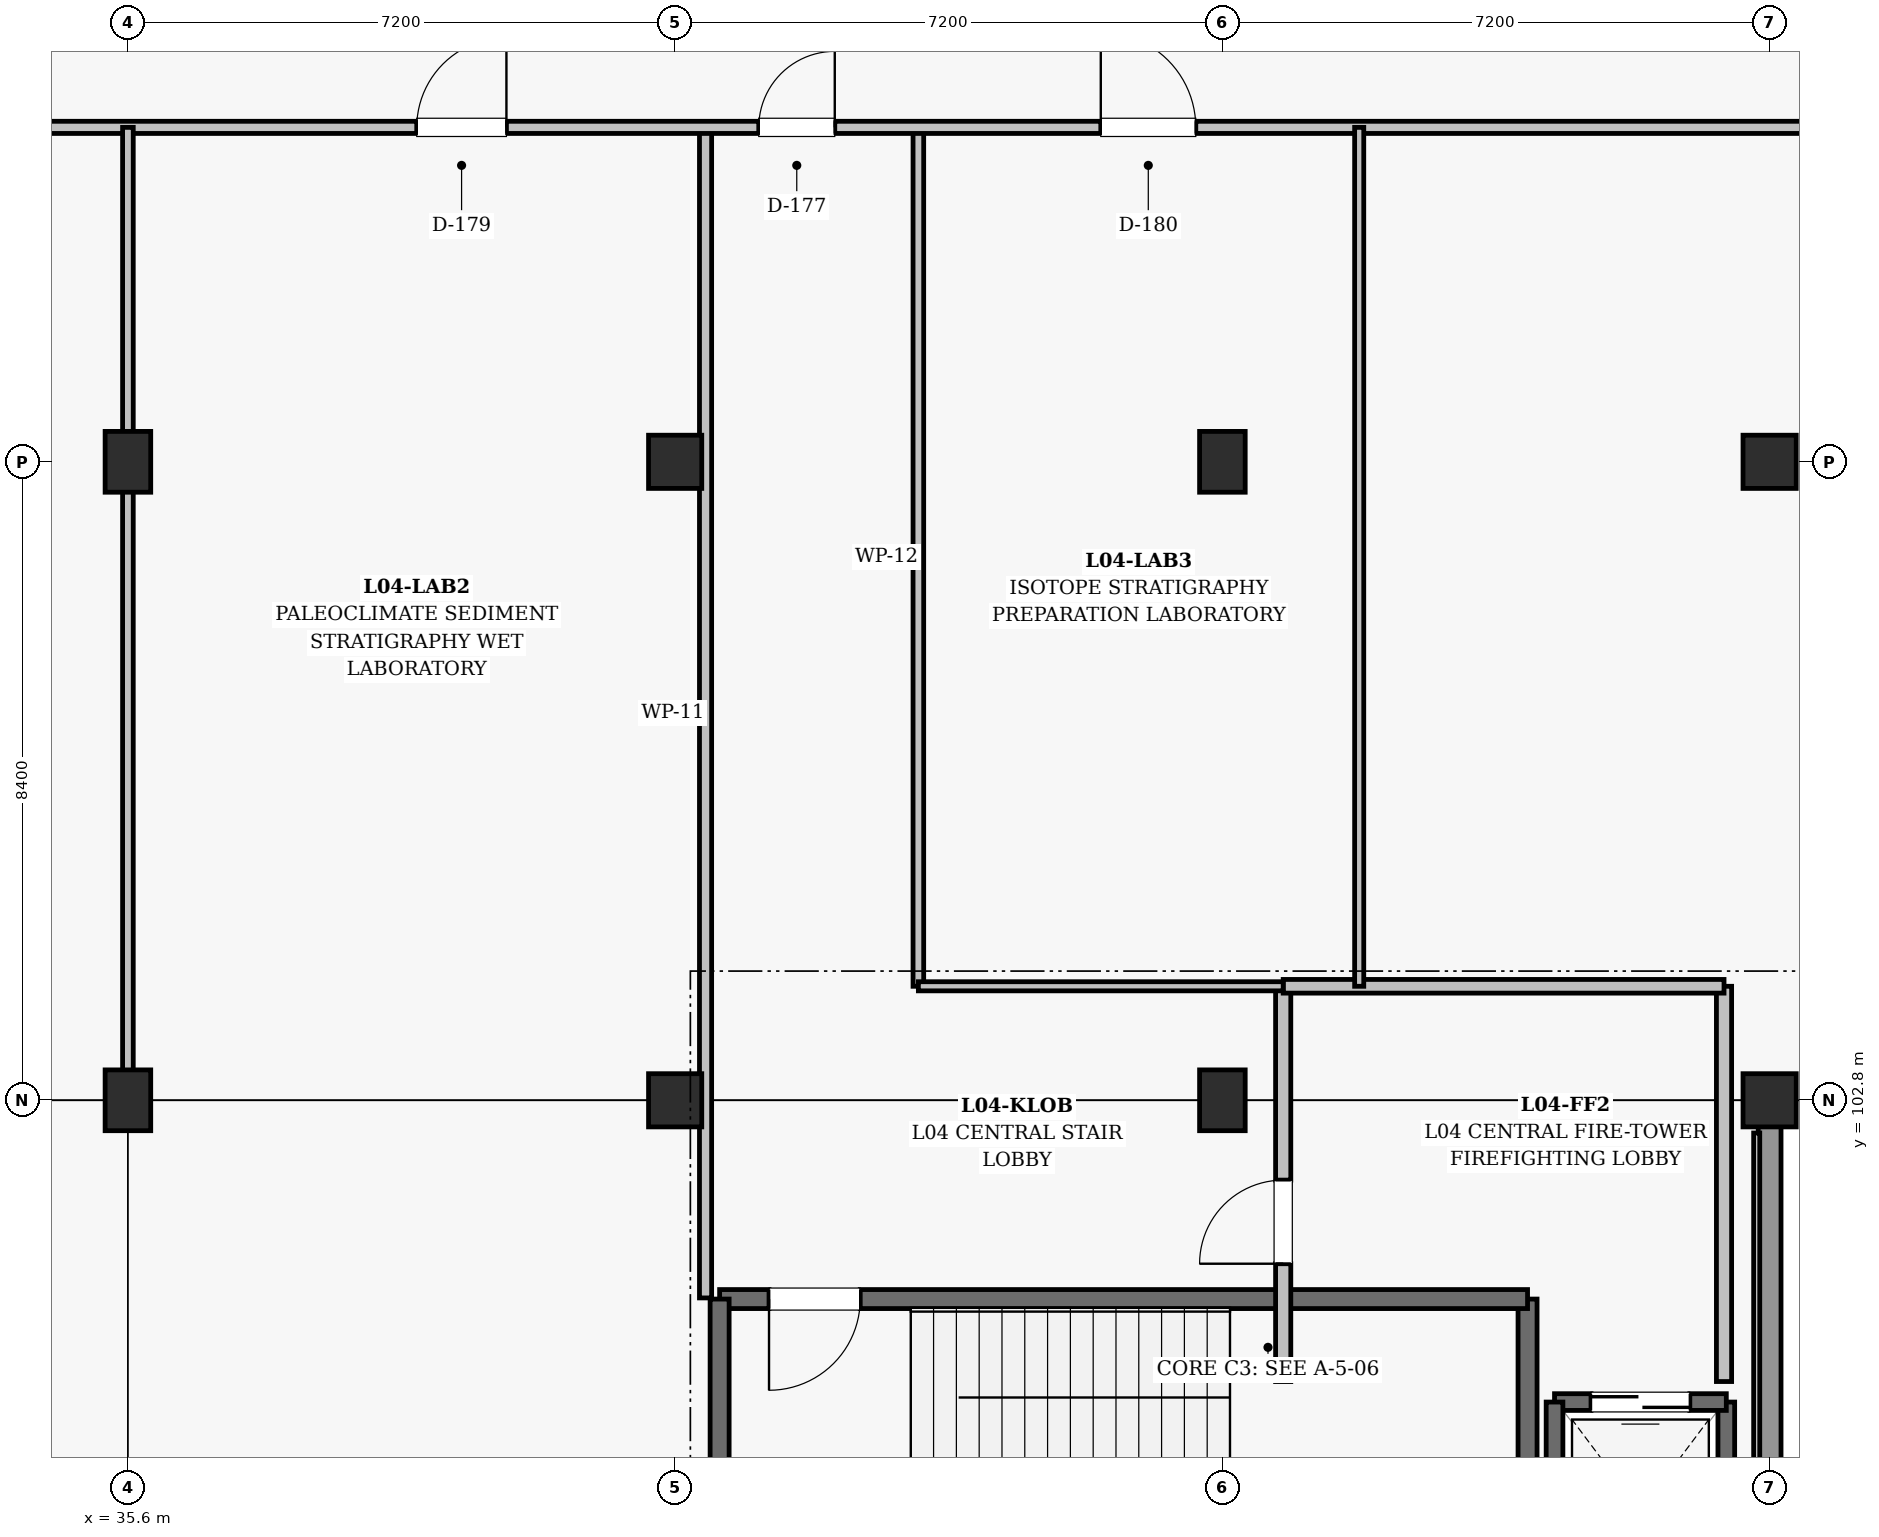
"""IFC4 building model, lengths in metres.
Left out: names, types, materials, properties, quantities, classifications, styles, units other than length and angle.
Written with IfcOpenShell. Run it as: python <this file> out.ifc"""

import sys

from ifc_helpers import new_model, si_unit, direction, frame, frame_2d, origin, origin_2d, place, context, subcontext, project, spatial, rectangle, extrude, element, fill, save


model = new_model("IFC4")
c1 = context("Model", 3, precision=1e-05, world=origin(), true_north=direction((0.0, 1.0)))
c2 = subcontext(c1, "Body", "Model", "MODEL_VIEW")
j1 = project(units=[si_unit("LENGTHUNIT", "METRE"), si_unit("PLANEANGLEUNIT", "RADIAN")], contexts=[c1])
p1 = place(None, origin())
s1 = spatial("IfcSite", under=j1, at=p1, CompositionType="ELEMENT")
p2 = place(p1, origin())
s2 = spatial("IfcBuilding", under=s1, at=p2, CompositionType="ELEMENT")
p3 = place(p2, frame((0.0, 0.0, 18.9)))
s3 = spatial("IfcBuildingStorey", under=s2, at=p3, CompositionType="ELEMENT", Elevation=18.9)
for number, where, z_axis, x_axis in (
    (1, (35.6, 102.8, 0.0), (0.0, 0.0, 1.0), (1.0, 0.0, 0.0)),
    (2, (35.6, 111.2, 0.0), (0.0, 0.0, 1.0), (1.0, 0.0, 0.0)),
):
    element("IfcColumn", number, at=place(p3, frame(where, z_axis=z_axis, x_axis=x_axis)), inside=s3, PredefinedType="COLUMN", context=c2, shape_type="SweptSolid", body=[
        extrude(rectangle(XDim=0.6, YDim=0.8, at=origin_2d()), origin(), (0.0, 0.0, 1.0), 4.5),
    ])
for number, where, z_axis, x_axis in (
    (3, (42.8, 102.8, 0.0), (0.0, 0.0, 1.0), (1.0, 0.0, 0.0)),
    (4, (42.8, 111.2, 0.0), (0.0, 0.0, 1.0), (1.0, 0.0, 0.0)),
):
    element("IfcColumn", number, at=place(p3, frame(where, z_axis=z_axis, x_axis=x_axis)), inside=s3, PredefinedType="COLUMN", context=c2, shape_type="SweptSolid", body=[
        extrude(rectangle(XDim=0.7, YDim=0.7, at=origin_2d()), origin(), (0.0, 0.0, 1.0), 4.5),
    ])
for number, where, z_axis, x_axis in (
    (5, (50.0, 102.8, 0.0), (0.0, 0.0, 1.0), (1.0, 0.0, 0.0)),
    (6, (50.0, 111.2, 0.0), (0.0, 0.0, 1.0), (1.0, 0.0, 0.0)),
):
    element("IfcColumn", number, at=place(p3, frame(where, z_axis=z_axis, x_axis=x_axis)), inside=s3, PredefinedType="COLUMN", context=c2, shape_type="SweptSolid", body=[
        extrude(rectangle(XDim=0.6, YDim=0.8, at=origin_2d()), origin(), (0.0, 0.0, 1.0), 4.5),
    ])
for number, where, z_axis, x_axis in (
    (7, (57.2, 102.8, 0.0), (0.0, 0.0, 1.0), (1.0, 0.0, 0.0)),
    (8, (57.2, 111.2, 0.0), (0.0, 0.0, 1.0), (1.0, 0.0, 0.0)),
):
    element("IfcColumn", number, at=place(p3, frame(where, z_axis=z_axis, x_axis=x_axis)), inside=s3, PredefinedType="COLUMN", context=c2, shape_type="SweptSolid", body=[
        extrude(rectangle(XDim=0.7, YDim=0.7, at=origin_2d()), origin(), (0.0, 0.0, 1.0), 4.5),
    ])
p4 = place(p3, frame((57.2, 94.705, 0.0), z_axis=(0.0, 0.0, 1.0), x_axis=(0.0, 1.0, 0.0)))
e9 = element("IfcWall", 9, at=p4, inside=s3, PredefinedType="SOLIDWALL", context=c2, shape_type="SweptSolid", body=[
    extrude(rectangle(XDim=7.765, YDim=0.3, at=frame_2d((3.882, 0.0))), origin(), (0.0, 0.0, 1.0), 3.355),
])
p5 = place(p3, frame((54.015, 95.085, 0.0), z_axis=(0.0, 0.0, 1.0), x_axis=(0.0, 1.0, 0.0)))
e10 = element("IfcWall", 10, at=p5, inside=s3, PredefinedType="SHEAR", context=c2, shape_type="SweptSolid", body=[
    extrude(rectangle(XDim=5.1, YDim=0.25, at=frame_2d((2.55, 0.0))), origin(), (0.0, 0.0, 1.0), 4.175),
])
p6 = place(p3, frame((54.015, 100.185, 0.0), z_axis=(0.0, 0.0, 1.0), x_axis=(-1.0, 0.0, 0.0)))
e11 = element("IfcWall", 11, at=p6, inside=s3, PredefinedType="SHEAR", context=c2, shape_type="SweptSolid", body=[
    extrude(rectangle(XDim=10.63, YDim=0.25, at=frame_2d((5.315, 0.0))), origin(), (0.0, 0.0, 1.0), 4.175),
])
p7 = place(p6, frame((8.78, 0.0, 0.0)))
e12 = element("IfcOpeningElement", 12, at=p7, cuts=e11, PredefinedType="OPENING", context=c2, shape_type="SweptSolid", body=[
    extrude(rectangle(XDim=1.2, YDim=2.15, at=frame_2d((0.6, 1.075))), frame((0.0, 0.135, 0.0), z_axis=(0.0, -1.0, 0.0), x_axis=(1.0, 0.0, 0.0)), (0.0, 0.0, 1.0), 0.27),
])
p8 = place(p3, frame((43.385, 100.185, 0.0), z_axis=(0.0, 0.0, 1.0), x_axis=(0.0, -1.0, 0.0)))
e13 = element("IfcWall", 13, at=p8, inside=s3, PredefinedType="SHEAR", context=c2, shape_type="SweptSolid", body=[
    extrude(rectangle(XDim=5.1, YDim=0.25, at=frame_2d((2.55, 0.0))), origin(), (0.0, 0.0, 1.0), 4.175),
])
p9 = place(p3, frame((56.63, 95.97, 0.0), z_axis=(0.0, 0.0, 1.0), x_axis=(0.0, 1.0, 0.0)))
e14 = element("IfcWall", 14, at=p9, inside=s3, PredefinedType="SHEAR", context=c2, shape_type="SweptSolid", body=[
    extrude(rectangle(XDim=2.86, YDim=0.22, at=frame_2d((1.43, 0.0))), origin(), (0.0, 0.0, 1.0), 4.175),
])
p10 = place(p3, frame((56.63, 98.83, 0.0), z_axis=(0.0, 0.0, 1.0), x_axis=(-1.0, 0.0, 0.0)))
e15 = element("IfcWall", 15, at=p10, inside=s3, PredefinedType="SHEAR", context=c2, shape_type="SweptSolid", body=[
    extrude(rectangle(XDim=2.26, YDim=0.22, at=frame_2d((1.13, 0.0))), origin(), (0.0, 0.0, 1.0), 4.175),
])
p11 = place(p10, frame((0.48, 0.0, 0.0)))
e16 = element("IfcOpeningElement", 16, at=p11, cuts=e15, PredefinedType="OPENING", context=c2, shape_type="SweptSolid", body=[
    extrude(rectangle(XDim=1.3, YDim=2.2, at=frame_2d((0.65, 1.1))), frame((0.0, 0.12, 0.0), z_axis=(0.0, -1.0, 0.0), x_axis=(1.0, 0.0, 0.0)), (0.0, 0.0, 1.0), 0.24),
])
p12 = place(p3, frame((54.37, 98.83, 0.0), z_axis=(0.0, 0.0, 1.0), x_axis=(0.0, -1.0, 0.0)))
e17 = element("IfcWall", 17, at=p12, inside=s3, PredefinedType="SHEAR", context=c2, shape_type="SweptSolid", body=[
    extrude(rectangle(XDim=2.86, YDim=0.22, at=frame_2d((1.43, 0.0))), origin(), (0.0, 0.0, 1.0), 4.175),
])
p13 = place(p3, frame((50.8, 99.1, 0.0), z_axis=(0.0, 0.0, 1.0), x_axis=(0.0, 1.0, 0.0)))
e18 = element("IfcWall", 18, at=p13, inside=s3, PredefinedType="SOLIDWALL", context=c2, shape_type="SweptSolid", body=[
    extrude(rectangle(XDim=5.2, YDim=0.2, at=frame_2d((2.6, 0.0))), origin(), (0.0, 0.0, 1.0), 3.36),
])
p14 = place(p13, frame((1.55, 0.0, 0.0)))
e19 = element("IfcOpeningElement", 19, at=p14, cuts=e18, PredefinedType="OPENING", context=c2, shape_type="SweptSolid", body=[
    extrude(rectangle(XDim=1.1, YDim=2.15, at=frame_2d((0.55, 1.075))), frame((0.0, 0.11, 0.0), z_axis=(0.0, -1.0, 0.0), x_axis=(1.0, 0.0, 0.0)), (0.0, 0.0, 1.0), 0.22),
])
p15 = place(p3, frame((56.6, 99.1, 0.0), z_axis=(0.0, 0.0, 1.0), x_axis=(0.0, 1.0, 0.0)))
e20 = element("IfcWall", 20, at=p15, inside=s3, PredefinedType="SOLIDWALL", context=c2, shape_type="SweptSolid", body=[
    extrude(rectangle(XDim=5.2, YDim=0.2, at=frame_2d((2.6, 0.0))), origin(), (0.0, 0.0, 1.0), 3.36),
])
p16 = place(p3, frame((50.8, 104.3, 0.0), z_axis=(0.0, 0.0, 1.0), x_axis=(1.0, 0.0, 0.0)))
e21 = element("IfcWall", 21, at=p16, inside=s3, PredefinedType="SOLIDWALL", context=c2, shape_type="SweptSolid", body=[
    extrude(rectangle(XDim=5.8, YDim=0.18, at=frame_2d((2.9, 0.0))), origin(), (0.0, 0.0, 1.0), 3.56),
])
p17 = place(p3, frame((43.2, 100.2, 0.0), z_axis=(0.0, 0.0, 1.0), x_axis=(0.0, 1.0, 0.0)))
e22 = element("IfcWall", 22, at=p17, inside=s3, PredefinedType="PARTITIONING", context=c2, shape_type="SweptSolid", body=[
    extrude(rectangle(XDim=15.4, YDim=0.16, at=frame_2d((7.7, 0.0))), origin(), (0.0, 0.0, 1.0), 2.96),
])
p18 = place(p3, frame((46.0, 104.3, 0.0), z_axis=(0.0, 0.0, 1.0), x_axis=(0.0, 1.0, 0.0)))
e23 = element("IfcWall", 23, at=p18, inside=s3, PredefinedType="PARTITIONING", context=c2, shape_type="SweptSolid", body=[
    extrude(rectangle(XDim=11.3, YDim=0.14, at=frame_2d((5.65, 0.0))), origin(), (0.0, 0.0, 1.0), 3.52),
])
p19 = place(p3, frame((46.0, 104.3, 0.0), z_axis=(0.0, 0.0, 1.0), x_axis=(1.0, 0.0, 0.0)))
e24 = element("IfcWall", 24, at=p19, inside=s3, PredefinedType="PARTITIONING", context=c2, shape_type="SweptSolid", body=[
    extrude(rectangle(XDim=4.8, YDim=0.12, at=frame_2d((2.4, 0.0))), origin(), (0.0, 0.0, 1.0), 3.31),
])
p20 = place(p3, frame((14.0, 115.6, 0.0), z_axis=(0.0, 0.0, 1.0), x_axis=(1.0, 0.0, 0.0)))
e25 = element("IfcWall", 25, at=p20, inside=s3, PredefinedType="PARTITIONING", context=c2, shape_type="SweptSolid", body=[
    extrude(rectangle(XDim=100.8, YDim=0.16, at=frame_2d((50.4, 0.0))), origin(), (0.0, 0.0, 1.0), 2.96),
])
p21 = place(p20, frame((29.9, 0.0, 0.0)))
e26 = element("IfcOpeningElement", 26, at=p21, cuts=e25, PredefinedType="OPENING", context=c2, shape_type="SweptSolid", body=[
    extrude(rectangle(XDim=1.0, YDim=2.15, at=frame_2d((0.5, 1.075))), frame((0.0, 0.09, 0.0), z_axis=(0.0, -1.0, 0.0), x_axis=(1.0, 0.0, 0.0)), (0.0, 0.0, 1.0), 0.18),
])
p22 = place(p20, frame((11.0, 0.0, 0.0)))
e27 = element("IfcOpeningElement", 27, at=p22, cuts=e25, PredefinedType="OPENING", context=c2, shape_type="SweptSolid", body=[
    extrude(rectangle(XDim=1.5, YDim=2.25, at=frame_2d((0.75, 1.125))), frame((0.0, 0.09, 0.0), z_axis=(0.0, -1.0, 0.0), x_axis=(1.0, 0.0, 0.0)), (0.0, 0.0, 1.0), 0.18),
])
p23 = place(p20, frame((25.4, 0.0, 0.0)))
e28 = element("IfcOpeningElement", 28, at=p23, cuts=e25, PredefinedType="OPENING", context=c2, shape_type="SweptSolid", body=[
    extrude(rectangle(XDim=1.18, YDim=2.2, at=frame_2d((0.59, 1.1))), frame((0.0, 0.09, 0.0), z_axis=(0.0, -1.0, 0.0), x_axis=(1.0, 0.0, 0.0)), (0.0, 0.0, 1.0), 0.18),
])
p24 = place(p20, frame((34.4, 0.0, 0.0)))
e29 = element("IfcOpeningElement", 29, at=p24, cuts=e25, PredefinedType="OPENING", context=c2, shape_type="SweptSolid", body=[
    extrude(rectangle(XDim=1.25, YDim=2.2, at=frame_2d((0.625, 1.1))), frame((0.0, 0.09, 0.0), z_axis=(0.0, -1.0, 0.0), x_axis=(1.0, 0.0, 0.0)), (0.0, 0.0, 1.0), 0.18),
])
p25 = place(p20, frame((47.7, 0.0, 0.0)))
e30 = element("IfcOpeningElement", 30, at=p25, cuts=e25, PredefinedType="OPENING", context=c2, shape_type="SweptSolid", body=[
    extrude(rectangle(XDim=2.05, YDim=2.3, at=frame_2d((1.025, 1.15))), frame((0.0, 0.09, 0.0), z_axis=(0.0, -1.0, 0.0), x_axis=(1.0, 0.0, 0.0)), (0.0, 0.0, 1.0), 0.18),
])
p26 = place(p20, frame((68.4, 0.0, 0.0)))
e31 = element("IfcOpeningElement", 31, at=p26, cuts=e25, PredefinedType="OPENING", context=c2, shape_type="SweptSolid", body=[
    extrude(rectangle(XDim=1.5, YDim=2.25, at=frame_2d((0.75, 1.125))), frame((0.0, 0.09, 0.0), z_axis=(0.0, -1.0, 0.0), x_axis=(1.0, 0.0, 0.0)), (0.0, 0.0, 1.0), 0.18),
])
p27 = place(p20, frame((89.8, 0.0, 0.0)))
e32 = element("IfcOpeningElement", 32, at=p27, cuts=e25, PredefinedType="OPENING", context=c2, shape_type="SweptSolid", body=[
    extrude(rectangle(XDim=1.5, YDim=2.25, at=frame_2d((0.75, 1.125))), frame((0.0, 0.09, 0.0), z_axis=(0.0, -1.0, 0.0), x_axis=(1.0, 0.0, 0.0)), (0.0, 0.0, 1.0), 0.18),
])
p28 = place(p3, frame((35.6, 102.8, 0.0), z_axis=(0.0, 0.0, 1.0), x_axis=(0.0, 1.0, 0.0)))
e33 = element("IfcWall", 33, at=p28, inside=s3, PredefinedType="PARTITIONING", context=c2, shape_type="SweptSolid", body=[
    extrude(rectangle(XDim=12.8, YDim=0.14, at=frame_2d((6.4, 0.0))), origin(), (0.0, 0.0, 1.0), 2.96),
])
p29 = place(p3, frame((51.8, 104.3, 0.0), z_axis=(0.0, 0.0, 1.0), x_axis=(0.0, 1.0, 0.0)))
e34 = element("IfcWall", 34, at=p29, inside=s3, PredefinedType="PARTITIONING", context=c2, shape_type="SweptSolid", body=[
    extrude(rectangle(XDim=11.3, YDim=0.12, at=frame_2d((5.65, 0.0))), origin(), (0.0, 0.0, 1.0), 3.44),
])
p30 = place(p7, origin())
e35 = element("IfcDoor", 35, at=p30, inside=s3, OperationType="SINGLE_SWING_RIGHT", PredefinedType="DOOR", context=c2, shape_type="SweptSolid", body=[
    extrude(rectangle(XDim=1.2, YDim=2.15, at=frame_2d((0.6, 1.075))), frame((0.0, 0.025, 0.0), z_axis=(0.0, -1.0, 0.0), x_axis=(1.0, 0.0, 0.0)), (0.0, 0.0, 1.0), 0.05),
])
fill(e12, e35)
p31 = place(p11, origin())
e36 = element("IfcDoor", 36, at=p31, inside=s3, OperationType="DOUBLE_DOOR_SLIDING", PredefinedType="DOOR", context=c2, shape_type="SweptSolid", body=[
    extrude(rectangle(XDim=1.3, YDim=2.2, at=frame_2d((0.65, 1.1))), frame((0.0, 0.025, 0.0), z_axis=(0.0, -1.0, 0.0), x_axis=(1.0, 0.0, 0.0)), (0.0, 0.0, 1.0), 0.05),
])
fill(e16, e36)
p32 = place(p14, origin())
e37 = element("IfcDoor", 37, at=p32, inside=s3, OperationType="SINGLE_SWING_LEFT", PredefinedType="DOOR", context=c2, shape_type="SweptSolid", body=[
    extrude(rectangle(XDim=1.1, YDim=2.15, at=frame_2d((0.55, 1.075))), frame((0.0, 0.025, 0.0), z_axis=(0.0, -1.0, 0.0), x_axis=(1.0, 0.0, 0.0)), (0.0, 0.0, 1.0), 0.05),
])
fill(e19, e37)
p33 = place(p21, origin())
e38 = element("IfcDoor", 38, at=p33, inside=s3, OperationType="SINGLE_SWING_RIGHT", PredefinedType="DOOR", context=c2, shape_type="SweptSolid", body=[
    extrude(rectangle(XDim=1.0, YDim=2.15, at=frame_2d((0.5, 1.075))), frame((0.0, 0.025, 0.0), z_axis=(0.0, -1.0, 0.0), x_axis=(1.0, 0.0, 0.0)), (0.0, 0.0, 1.0), 0.05),
])
fill(e26, e38)
p34 = place(p23, origin())
e39 = element("IfcDoor", 39, at=p34, inside=s3, OperationType="SINGLE_SWING_RIGHT", PredefinedType="DOOR", context=c2, shape_type="SweptSolid", body=[
    extrude(rectangle(XDim=1.18, YDim=2.2, at=frame_2d((0.59, 1.1))), frame((0.0, 0.025, 0.0), z_axis=(0.0, -1.0, 0.0), x_axis=(1.0, 0.0, 0.0)), (0.0, 0.0, 1.0), 0.05),
])
fill(e28, e39)
p35 = place(p24, origin())
e40 = element("IfcDoor", 40, at=p35, inside=s3, OperationType="SINGLE_SWING_LEFT", PredefinedType="DOOR", context=c2, shape_type="SweptSolid", body=[
    extrude(rectangle(XDim=1.25, YDim=2.2, at=frame_2d((0.625, 1.1))), frame((0.0, 0.025, 0.0), z_axis=(0.0, -1.0, 0.0), x_axis=(1.0, 0.0, 0.0)), (0.0, 0.0, 1.0), 0.05),
])
fill(e29, e40)
save(model, sys.argv[1])
